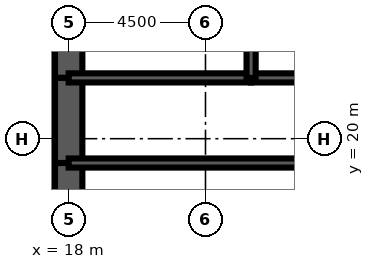
"""IFC4 building model, lengths in metres.
Left out: names, types, materials, properties, quantities, classifications, styles, units other than length and angle.
Written with IfcOpenShell. Run it as: python <this file> out.ifc"""

import sys

from ifc_helpers import new_model, si_unit, direction, frame, frame_2d, origin, place, context, subcontext, project, spatial, rectangle, extrude, element, fill, save


model = new_model("IFC4")
c1 = context("Model", 3, precision=1e-05, world=origin(), true_north=direction((0.0, 1.0)))
c2 = subcontext(c1, "Body", "Model", "MODEL_VIEW")
j1 = project(units=[si_unit("LENGTHUNIT", "METRE"), si_unit("PLANEANGLEUNIT", "RADIAN")], contexts=[c1])
p1 = place(None, origin())
s1 = spatial("IfcSite", under=j1, at=p1, CompositionType="ELEMENT")
p2 = place(p1, origin())
s2 = spatial("IfcBuilding", under=s1, at=p2, CompositionType="ELEMENT")
p3 = place(p2, frame((0.0, 0.0, 36.5)))
s3 = spatial("IfcBuildingStorey", under=s2, at=p3, CompositionType="ELEMENT", Elevation=36.5)
p4 = place(p3, frame((18.0, 26.0, 0.0), z_axis=(0.0, 0.0, 1.0), x_axis=(0.0, -1.0, 0.0)))
e1 = element("IfcWall", 1, at=p4, inside=s3, PredefinedType="SHEAR", context=c2, shape_type="SweptSolid", body=[
    extrude(rectangle(XDim=4.0, YDim=0.9, at=frame_2d((2.0, 0.0))), origin(), (0.0, 0.0, 1.0), 4.5),
])
p5 = place(p3, frame((18.0, 22.0, 0.0), z_axis=(0.0, 0.0, 1.0), x_axis=(0.0, -1.0, 0.0)))
e2 = element("IfcWall", 2, at=p5, inside=s3, PredefinedType="SHEAR", context=c2, shape_type="SweptSolid", body=[
    extrude(rectangle(XDim=2.8, YDim=0.9, at=frame_2d((1.4, 0.0))), origin(), (0.0, 0.0, 1.0), 4.5),
])
p6 = place(p5, frame((0.6, 0.0, 0.0)))
e3 = element("IfcOpeningElement", 3, at=p6, cuts=e2, PredefinedType="OPENING", context=c2, shape_type="SweptSolid", body=[
    extrude(rectangle(XDim=1.8, YDim=2.1, at=frame_2d((0.9, 1.05))), frame((0.0, 0.46, 0.0), z_axis=(0.0, -1.0, 0.0), x_axis=(1.0, 0.0, 0.0)), (0.0, 0.0, 1.0), 0.92),
])
p7 = place(p3, frame((18.0, 19.2, 0.0), z_axis=(0.0, 0.0, 1.0), x_axis=(0.0, -1.0, 0.0)))
e4 = element("IfcWall", 4, at=p7, inside=s3, PredefinedType="SHEAR", context=c2, shape_type="SweptSolid", body=[
    extrude(rectangle(XDim=3.2, YDim=0.9, at=frame_2d((1.6, 0.0))), origin(), (0.0, 0.0, 1.0), 4.5),
])
p8 = place(p3, frame((18.0, 19.2, 0.0), z_axis=(0.0, 0.0, 1.0), x_axis=(1.0, 0.0, 0.0)))
e5 = element("IfcWall", 5, at=p8, inside=s3, PredefinedType="SOLIDWALL", context=c2, shape_type="SweptSolid", body=[
    extrude(rectangle(XDim=9.0, YDim=0.3, at=frame_2d((4.5, 0.0))), origin(), (0.0, 0.0, 1.0), 4.5),
])
p9 = place(p8, frame((0.65, 0.0, 0.0)))
e6 = element("IfcOpeningElement", 6, at=p9, cuts=e5, PredefinedType="OPENING", context=c2, shape_type="SweptSolid", body=[
    extrude(rectangle(XDim=1.0, YDim=2.1, at=frame_2d((0.5, 1.05))), frame((0.0, 0.16, 0.0), z_axis=(0.0, -1.0, 0.0), x_axis=(1.0, 0.0, 0.0)), (0.0, 0.0, 1.0), 0.32),
])
p10 = place(p3, frame((18.0, 22.0, 0.0), z_axis=(0.0, 0.0, 1.0), x_axis=(1.0, 0.0, 0.0)))
e7 = element("IfcWall", 7, at=p10, inside=s3, PredefinedType="SOLIDWALL", context=c2, shape_type="SweptSolid", body=[
    extrude(rectangle(XDim=6.0, YDim=0.3, at=frame_2d((3.0, 0.0))), origin(), (0.0, 0.0, 1.0), 4.5),
])
p11 = place(p10, frame((2.0, 0.0, 0.0)))
e8 = element("IfcOpeningElement", 8, at=p11, cuts=e7, PredefinedType="OPENING", context=c2, shape_type="SweptSolid", body=[
    extrude(rectangle(XDim=1.0, YDim=2.1, at=frame_2d((0.5, 1.05))), frame((0.0, 0.16, 0.0), z_axis=(0.0, -1.0, 0.0), x_axis=(1.0, 0.0, 0.0)), (0.0, 0.0, 1.0), 0.32),
])
p12 = place(p3, frame((24.0, 22.0, 0.0), z_axis=(0.0, 0.0, 1.0), x_axis=(1.0, 0.0, 0.0)))
e9 = element("IfcWall", 9, at=p12, inside=s3, PredefinedType="SOLIDWALL", context=c2, shape_type="SweptSolid", body=[
    extrude(rectangle(XDim=3.0, YDim=0.3, at=frame_2d((1.5, 0.0))), origin(), (0.0, 0.0, 1.0), 4.5),
])
p13 = place(p12, frame((1.0, 0.0, 0.0)))
e10 = element("IfcOpeningElement", 10, at=p13, cuts=e9, PredefinedType="OPENING", context=c2, shape_type="SweptSolid", body=[
    extrude(rectangle(XDim=1.0, YDim=2.1, at=frame_2d((0.5, 1.05))), frame((0.0, 0.16, 0.0), z_axis=(0.0, -1.0, 0.0), x_axis=(1.0, 0.0, 0.0)), (0.0, 0.0, 1.0), 0.32),
])
p14 = place(p3, frame((24.0, 22.0, 0.0), z_axis=(0.0, 0.0, 1.0), x_axis=(0.0, 1.0, 0.0)))
e11 = element("IfcWall", 11, at=p14, inside=s3, PredefinedType="SOLIDWALL", context=c2, shape_type="SweptSolid", body=[
    extrude(rectangle(XDim=4.0, YDim=0.3, at=frame_2d((2.0, 0.0))), origin(), (0.0, 0.0, 1.0), 4.5),
])
p15 = place(p3, frame((24.5, 19.35, 0.0), z_axis=(0.0, 0.0, 1.0), x_axis=(0.0, 1.0, 0.0)))
e12 = element("IfcWall", 12, at=p15, inside=s3, PredefinedType="PARTITIONING", context=c2, shape_type="SweptSolid", body=[
    extrude(rectangle(XDim=2.5, YDim=0.15, at=frame_2d((1.25, 0.0))), origin(), (0.0, 0.0, 1.0), 3.0),
])
p16 = place(p15, frame((1.15, 0.0, 0.0)))
e13 = element("IfcOpeningElement", 13, at=p16, cuts=e12, PredefinedType="OPENING", context=c2, shape_type="SweptSolid", body=[
    extrude(rectangle(XDim=1.0, YDim=2.1, at=frame_2d((0.5, 1.05))), frame((0.0, 0.085, 0.0), z_axis=(0.0, -1.0, 0.0), x_axis=(1.0, 0.0, 0.0)), (0.0, 0.0, 1.0), 0.17),
])
p17 = place(p16, origin())
e14 = element("IfcDoor", 14, at=p17, inside=s3, OperationType="SINGLE_SWING_RIGHT", PredefinedType="DOOR", context=c2, shape_type="SweptSolid", body=[
    extrude(rectangle(XDim=1.0, YDim=2.1, at=frame_2d((0.5, 1.05))), frame((0.0, 0.025, 0.0), z_axis=(0.0, -1.0, 0.0), x_axis=(1.0, 0.0, 0.0)), (0.0, 0.0, 1.0), 0.05),
])
fill(e13, e14)
p18 = place(p9, origin())
e15 = element("IfcDoor", 15, at=p18, inside=s3, OperationType="SINGLE_SWING_LEFT", PredefinedType="DOOR", context=c2, shape_type="SweptSolid", body=[
    extrude(rectangle(XDim=1.0, YDim=2.1, at=frame_2d((0.5, 1.05))), frame((0.0, 0.025, 0.0), z_axis=(0.0, -1.0, 0.0), x_axis=(1.0, 0.0, 0.0)), (0.0, 0.0, 1.0), 0.05),
])
fill(e6, e15)
p19 = place(p6, origin())
e16 = element("IfcDoor", 16, at=p19, inside=s3, OperationType="SINGLE_SWING_LEFT", PredefinedType="DOOR", context=c2, shape_type="SweptSolid", body=[
    extrude(rectangle(XDim=1.8, YDim=2.1, at=frame_2d((0.9, 1.05))), frame((0.0, 0.45, 0.0), z_axis=(0.0, -1.0, 0.0), x_axis=(1.0, 0.0, 0.0)), (0.0, 0.0, 1.0), 0.899),
])
fill(e3, e16)
p20 = place(p11, origin())
e17 = element("IfcDoor", 17, at=p20, inside=s3, OperationType="SINGLE_SWING_LEFT", PredefinedType="DOOR", context=c2, shape_type="SweptSolid", body=[
    extrude(rectangle(XDim=1.0, YDim=2.1, at=frame_2d((0.5, 1.05))), frame((0.0, 0.025, 0.0), z_axis=(0.0, -1.0, 0.0), x_axis=(1.0, 0.0, 0.0)), (0.0, 0.0, 1.0), 0.05),
])
fill(e8, e17)
p21 = place(p13, origin())
e18 = element("IfcDoor", 18, at=p21, inside=s3, OperationType="SINGLE_SWING_LEFT", PredefinedType="DOOR", context=c2, shape_type="SweptSolid", body=[
    extrude(rectangle(XDim=1.0, YDim=2.1, at=frame_2d((0.5, 1.05))), frame((0.0, 0.025, 0.0), z_axis=(0.0, -1.0, 0.0), x_axis=(1.0, 0.0, 0.0)), (0.0, 0.0, 1.0), 0.05),
])
fill(e10, e18)
save(model, sys.argv[1])
